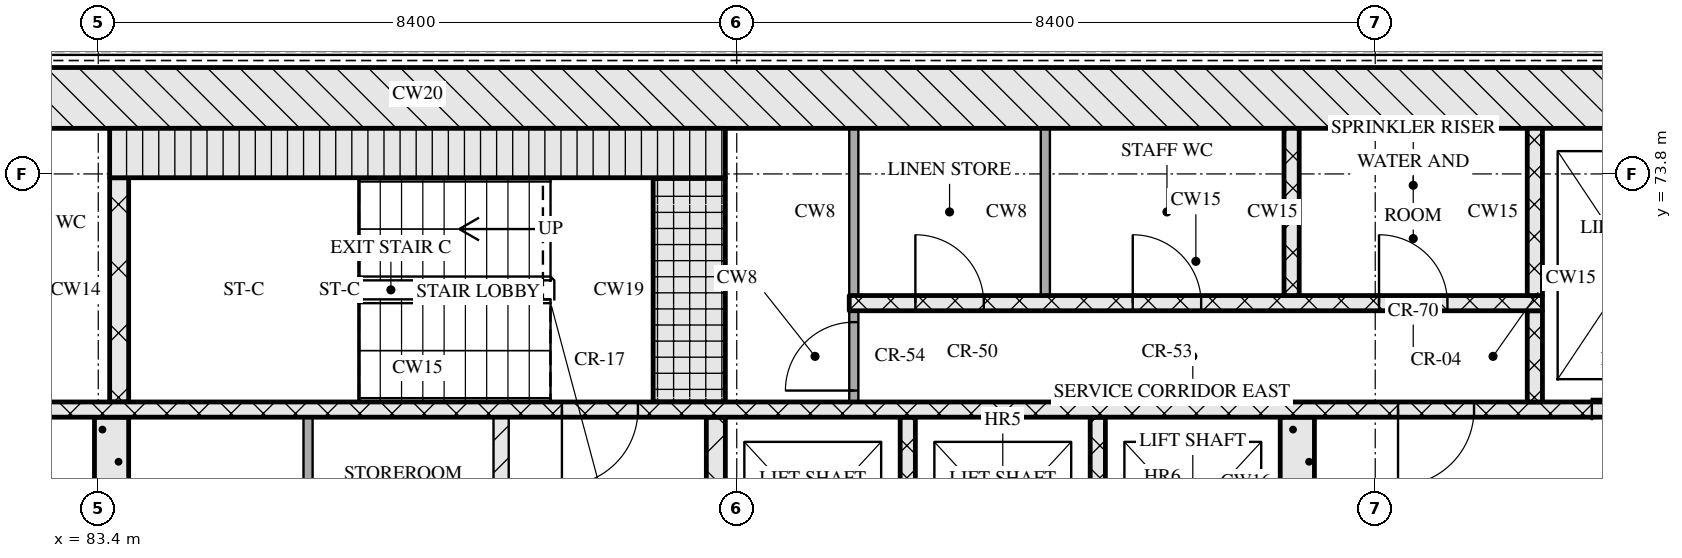
"""IFC4 building model, lengths in metres.
Left out: names, types, materials, properties, quantities, classifications, styles, units other than length and angle.
Written with IfcOpenShell. Run it as: python <this file> out.ifc"""

import sys

from ifc_helpers import new_model, si_unit, direction, frame, frame_2d, origin, place, context, subcontext, project, spatial, rectangle, extrude, element, fill, save


model = new_model("IFC4")
c1 = context("Model", 3, precision=1e-05, world=origin(), true_north=direction((0.0, 1.0)))
c2 = subcontext(c1, "Body", "Model", "MODEL_VIEW")
j1 = project(units=[si_unit("LENGTHUNIT", "METRE"), si_unit("PLANEANGLEUNIT", "RADIAN")], contexts=[c1])
p1 = place(None, origin())
s1 = spatial("IfcSite", under=j1, at=p1, CompositionType="ELEMENT")
p2 = place(p1, origin())
s2 = spatial("IfcBuilding", under=s1, at=p2, CompositionType="ELEMENT")
p3 = place(p2, frame((0.0, 0.0, 151.05)))
s3 = spatial("IfcBuildingStorey", under=s2, at=p3, CompositionType="ELEMENT", Elevation=151.05)
p4 = place(p3, frame((67.0, 74.8, 0.0), z_axis=(0.0, 0.0, 1.0), x_axis=(1.0, 0.0, 0.0)))
e1 = element("IfcWall", 1, at=p4, inside=s3, PredefinedType="SOLIDWALL", context=c2, shape_type="SweptSolid", body=[
    extrude(rectangle(XDim=41.2, YDim=0.8, at=frame_2d((20.6, 0.0))), origin(), (0.0, 0.0, 1.0), 3.32),
])
p5 = place(p3, frame((83.575, 68.0, 0.0), z_axis=(0.0, 0.0, 1.0), x_axis=(0.0, 1.0, 0.0)))
e2 = element("IfcWall", 2, at=p5, inside=s3, PredefinedType="SOLIDWALL", context=c2, shape_type="SweptSolid", body=[
    extrude(rectangle(XDim=2.6, YDim=0.45, at=frame_2d((1.3, 0.0))), origin(), (0.0, 0.0, 1.0), 3.32),
])
p6 = place(p3, frame((86.16, 68.0, 0.0), z_axis=(0.0, 0.0, 1.0), x_axis=(0.0, 1.0, 0.0)))
e3 = element("IfcWall", 3, at=p6, inside=s3, PredefinedType="PARTITIONING", context=c2, shape_type="SweptSolid", body=[
    extrude(rectangle(XDim=2.6, YDim=0.12, at=frame_2d((1.3, 0.0))), origin(), (0.0, 0.0, 1.0), 3.32),
])
p7 = place(p3, frame((88.7, 68.0, 0.0), z_axis=(0.0, 0.0, 1.0), x_axis=(0.0, 1.0, 0.0)))
e4 = element("IfcWall", 4, at=p7, inside=s3, PredefinedType="PARTITIONING", context=c2, shape_type="SweptSolid", body=[
    extrude(rectangle(XDim=2.6, YDim=0.2, at=frame_2d((1.3, 0.0))), origin(), (0.0, 0.0, 1.0), 3.32),
])
p8 = place(p3, frame((91.525, 68.0, 0.0), z_axis=(0.0, 0.0, 1.0), x_axis=(0.0, 1.0, 0.0)))
e5 = element("IfcWall", 5, at=p8, inside=s3, PredefinedType="SOLIDWALL", context=c2, shape_type="SweptSolid", body=[
    extrude(rectangle(XDim=2.6, YDim=0.25, at=frame_2d((1.3, 0.0))), origin(), (0.0, 0.0, 1.0), 3.32),
])
for number, where, z_axis, x_axis in (
    (6, (94.05, 68.0, 0.0), (0.0, 0.0, 1.0), (0.0, 1.0, 0.0)),
    (7, (96.55, 68.0, 0.0), (0.0, 0.0, 1.0), (0.0, 1.0, 0.0)),
):
    element("IfcWall", number, at=place(p3, frame(where, z_axis=z_axis, x_axis=x_axis)), inside=s3, PredefinedType="SOLIDWALL", context=c2, shape_type="SweptSolid", body=[
        extrude(rectangle(XDim=2.6, YDim=0.2, at=frame_2d((1.3, 0.0))), origin(), (0.0, 0.0, 1.0), 3.32),
    ])
p9 = place(p3, frame((99.175, 68.3, 0.0), z_axis=(0.0, 0.0, 1.0), x_axis=(0.0, 1.0, 0.0)))
e8 = element("IfcWall", 8, at=p9, inside=s3, PredefinedType="SOLIDWALL", context=c2, shape_type="SweptSolid", body=[
    extrude(rectangle(XDim=2.3, YDim=0.45, at=frame_2d((1.15, 0.0))), origin(), (0.0, 0.0, 1.0), 3.32),
])
p10 = place(p3, frame((67.8, 70.7, 0.0), z_axis=(0.0, 0.0, 1.0), x_axis=(1.0, 0.0, 0.0)))
e9 = element("IfcWall", 9, at=p10, inside=s3, PredefinedType="SOLIDWALL", context=c2, shape_type="SweptSolid", body=[
    extrude(rectangle(XDim=39.6, YDim=0.2, at=frame_2d((19.8, 0.0))), origin(), (0.0, 0.0, 1.0), 3.32),
])
p11 = place(p10, frame((0.65, 0.0, 0.0)))
e10 = element("IfcOpeningElement", 10, at=p11, cuts=e9, PredefinedType="OPENING", context=c2, shape_type="SweptSolid", body=[
    extrude(rectangle(XDim=1.1, YDim=2.1, at=frame_2d((0.55, 1.05))), frame((0.0, 0.11, 0.0), z_axis=(0.0, -1.0, 0.0), x_axis=(1.0, 0.0, 0.0)), (0.0, 0.0, 1.0), 0.22),
])
p12 = place(p10, frame((3.25, 0.0, 0.0)))
e11 = element("IfcOpeningElement", 11, at=p12, cuts=e9, PredefinedType="OPENING", context=c2, shape_type="SweptSolid", body=[
    extrude(rectangle(XDim=1.1, YDim=2.1, at=frame_2d((0.55, 1.05))), frame((0.0, 0.11, 0.0), z_axis=(0.0, -1.0, 0.0), x_axis=(1.0, 0.0, 0.0)), (0.0, 0.0, 1.0), 0.22),
])
p13 = place(p10, frame((5.9, 0.0, 0.0)))
e12 = element("IfcOpeningElement", 12, at=p13, cuts=e9, PredefinedType="OPENING", context=c2, shape_type="SweptSolid", body=[
    extrude(rectangle(XDim=1.0, YDim=2.1, at=frame_2d((0.5, 1.05))), frame((0.0, 0.11, 0.0), z_axis=(0.0, -1.0, 0.0), x_axis=(1.0, 0.0, 0.0)), (0.0, 0.0, 1.0), 0.22),
])
p14 = place(p10, frame((21.7, 0.0, 0.0)))
e13 = element("IfcOpeningElement", 13, at=p14, cuts=e9, PredefinedType="OPENING", context=c2, shape_type="SweptSolid", body=[
    extrude(rectangle(XDim=1.0, YDim=2.1, at=frame_2d((0.5, 1.05))), frame((0.0, 0.11, 0.0), z_axis=(0.0, -1.0, 0.0), x_axis=(1.0, 0.0, 0.0)), (0.0, 0.0, 1.0), 0.22),
])
p15 = place(p10, frame((32.7, 0.0, 0.0)))
e14 = element("IfcOpeningElement", 14, at=p15, cuts=e9, PredefinedType="OPENING", context=c2, shape_type="SweptSolid", body=[
    extrude(rectangle(XDim=1.0, YDim=2.1, at=frame_2d((0.5, 1.05))), frame((0.0, 0.11, 0.0), z_axis=(0.0, -1.0, 0.0), x_axis=(1.0, 0.0, 0.0)), (0.0, 0.0, 1.0), 0.22),
])
p16 = place(p10, frame((35.25, 0.0, 0.0)))
e15 = element("IfcOpeningElement", 15, at=p16, cuts=e9, PredefinedType="OPENING", context=c2, shape_type="SweptSolid", body=[
    extrude(rectangle(XDim=1.1, YDim=2.1, at=frame_2d((0.55, 1.05))), frame((0.0, 0.11, 0.0), z_axis=(0.0, -1.0, 0.0), x_axis=(1.0, 0.0, 0.0)), (0.0, 0.0, 1.0), 0.22),
])
p17 = place(p10, frame((37.85, 0.0, 0.0)))
e16 = element("IfcOpeningElement", 16, at=p17, cuts=e9, PredefinedType="OPENING", context=c2, shape_type="SweptSolid", body=[
    extrude(rectangle(XDim=1.1, YDim=2.1, at=frame_2d((0.55, 1.05))), frame((0.0, 0.11, 0.0), z_axis=(0.0, -1.0, 0.0), x_axis=(1.0, 0.0, 0.0)), (0.0, 0.0, 1.0), 0.22),
])
p18 = place(p3, frame((83.675, 70.8, 0.0), z_axis=(0.0, 0.0, 1.0), x_axis=(0.0, 1.0, 0.0)))
e17 = element("IfcWall", 17, at=p18, inside=s3, PredefinedType="SOLIDWALL", context=c2, shape_type="SweptSolid", body=[
    extrude(rectangle(XDim=2.95, YDim=0.25, at=frame_2d((1.475, 0.0))), origin(), (0.0, 0.0, 1.0), 3.32),
])
p19 = place(p3, frame((91.175, 70.8, 0.0), z_axis=(0.0, 0.0, 1.0), x_axis=(0.0, 1.0, 0.0)))
e18 = element("IfcWall", 18, at=p19, inside=s3, PredefinedType="SOLIDWALL", context=c2, shape_type="SweptSolid", body=[
    extrude(rectangle(XDim=2.95, YDim=0.95, at=frame_2d((1.475, 0.0))), origin(), (0.0, 0.0, 1.0), 3.32),
])
p20 = place(p3, frame((93.34, 70.8, 0.0), z_axis=(0.0, 0.0, 1.0), x_axis=(0.0, 1.0, 0.0)))
e19 = element("IfcWall", 19, at=p20, inside=s3, PredefinedType="PARTITIONING", context=c2, shape_type="SweptSolid", body=[
    extrude(rectangle(XDim=1.2, YDim=0.12, at=frame_2d((0.6, 0.0))), origin(), (0.0, 0.0, 1.0), 3.32),
])
p21 = place(p20, frame((0.15, 0.0, 0.0)))
e20 = element("IfcOpeningElement", 20, at=p21, cuts=e19, PredefinedType="OPENING", context=c2, shape_type="SweptSolid", body=[
    extrude(rectangle(XDim=0.9, YDim=2.1, at=frame_2d((0.45, 1.05))), frame((0.0, 0.07, 0.0), z_axis=(0.0, -1.0, 0.0), x_axis=(1.0, 0.0, 0.0)), (0.0, 0.0, 1.0), 0.14),
])
p22 = place(p3, frame((102.3, 70.8, 0.0), z_axis=(0.0, 0.0, 1.0), x_axis=(0.0, 1.0, 0.0)))
e21 = element("IfcWall", 21, at=p22, inside=s3, PredefinedType="SOLIDWALL", context=c2, shape_type="SweptSolid", body=[
    extrude(rectangle(XDim=1.2, YDim=0.2, at=frame_2d((0.6, 0.0))), origin(), (0.0, 0.0, 1.0), 3.32),
])
p23 = place(p3, frame((93.28, 72.1, 0.0), z_axis=(0.0, 0.0, 1.0), x_axis=(1.0, 0.0, 0.0)))
e22 = element("IfcWall", 22, at=p23, inside=s3, PredefinedType="SOLIDWALL", context=c2, shape_type="SweptSolid", body=[
    extrude(rectangle(XDim=9.12, YDim=0.2, at=frame_2d((4.56, 0.0))), origin(), (0.0, 0.0, 1.0), 3.32),
])
p24 = place(p23, frame((0.87, 0.0, 0.0)))
e23 = element("IfcOpeningElement", 23, at=p24, cuts=e22, PredefinedType="OPENING", context=c2, shape_type="SweptSolid", body=[
    extrude(rectangle(XDim=0.9, YDim=2.1, at=frame_2d((0.45, 1.05))), frame((0.0, 0.11, 0.0), z_axis=(0.0, -1.0, 0.0), x_axis=(1.0, 0.0, 0.0)), (0.0, 0.0, 1.0), 0.22),
])
p25 = place(p23, frame((3.73, 0.0, 0.0)))
e24 = element("IfcOpeningElement", 24, at=p25, cuts=e22, PredefinedType="OPENING", context=c2, shape_type="SweptSolid", body=[
    extrude(rectangle(XDim=0.9, YDim=2.1, at=frame_2d((0.45, 1.05))), frame((0.0, 0.11, 0.0), z_axis=(0.0, -1.0, 0.0), x_axis=(1.0, 0.0, 0.0)), (0.0, 0.0, 1.0), 0.22),
])
p26 = place(p23, frame((6.97, 0.0, 0.0)))
e25 = element("IfcOpeningElement", 25, at=p26, cuts=e22, PredefinedType="OPENING", context=c2, shape_type="SweptSolid", body=[
    extrude(rectangle(XDim=0.9, YDim=2.1, at=frame_2d((0.45, 1.05))), frame((0.0, 0.11, 0.0), z_axis=(0.0, -1.0, 0.0), x_axis=(1.0, 0.0, 0.0)), (0.0, 0.0, 1.0), 0.22),
])
for number, where, z_axis, x_axis in (
    (26, (93.34, 72.2, 0.0), (0.0, 0.0, 1.0), (0.0, 1.0, 0.0)),
    (27, (95.86, 72.2, 0.0), (0.0, 0.0, 1.0), (0.0, 1.0, 0.0)),
):
    element("IfcWall", number, at=place(p3, frame(where, z_axis=z_axis, x_axis=x_axis)), inside=s3, PredefinedType="PARTITIONING", context=c2, shape_type="SweptSolid", body=[
        extrude(rectangle(XDim=2.2, YDim=0.12, at=frame_2d((1.1, 0.0))), origin(), (0.0, 0.0, 1.0), 3.32),
    ])
for number, where, z_axis, x_axis in (
    (28, (99.1, 72.2, 0.0), (0.0, 0.0, 1.0), (0.0, 1.0, 0.0)),
    (29, (102.3, 72.2, 0.0), (0.0, 0.0, 1.0), (0.0, 1.0, 0.0)),
):
    element("IfcWall", number, at=place(p3, frame(where, z_axis=z_axis, x_axis=x_axis)), inside=s3, PredefinedType="SOLIDWALL", context=c2, shape_type="SweptSolid", body=[
        extrude(rectangle(XDim=2.2, YDim=0.2, at=frame_2d((1.1, 0.0))), origin(), (0.0, 0.0, 1.0), 3.32),
    ])
p27 = place(p3, frame((83.55, 74.075, 0.0), z_axis=(0.0, 0.0, 1.0), x_axis=(1.0, 0.0, 0.0)))
e30 = element("IfcWall", 30, at=p27, inside=s3, PredefinedType="SOLIDWALL", context=c2, shape_type="SweptSolid", body=[
    extrude(rectangle(XDim=8.1, YDim=0.65, at=frame_2d((4.05, 0.0))), origin(), (0.0, 0.0, 1.0), 3.32),
])
p28 = place(p14, origin())
e31 = element("IfcDoor", 31, at=p28, inside=s3, OperationType="SINGLE_SWING_RIGHT", PredefinedType="DOOR", context=c2, shape_type="SweptSolid", body=[
    extrude(rectangle(XDim=1.0, YDim=2.1, at=frame_2d((0.5, 1.05))), frame((0.0, 0.025, 0.0), z_axis=(0.0, -1.0, 0.0), x_axis=(1.0, 0.0, 0.0)), (0.0, 0.0, 1.0), 0.05),
])
fill(e13, e31)
p29 = place(p15, origin())
e32 = element("IfcDoor", 32, at=p29, inside=s3, OperationType="SINGLE_SWING_RIGHT", PredefinedType="DOOR", context=c2, shape_type="SweptSolid", body=[
    extrude(rectangle(XDim=1.0, YDim=2.1, at=frame_2d((0.5, 1.05))), frame((0.0, 0.025, 0.0), z_axis=(0.0, -1.0, 0.0), x_axis=(1.0, 0.0, 0.0)), (0.0, 0.0, 1.0), 0.05),
])
fill(e14, e32)
p30 = place(p16, origin())
e33 = element("IfcDoor", 33, at=p30, inside=s3, OperationType="SLIDING_TO_RIGHT", PredefinedType="DOOR", context=c2, shape_type="SweptSolid", body=[
    extrude(rectangle(XDim=1.1, YDim=2.1, at=frame_2d((0.55, 1.05))), frame((0.0, 0.025, 0.0), z_axis=(0.0, -1.0, 0.0), x_axis=(1.0, 0.0, 0.0)), (0.0, 0.0, 1.0), 0.05),
])
fill(e15, e33)
p31 = place(p21, origin())
e34 = element("IfcDoor", 34, at=p31, inside=s3, OperationType="SINGLE_SWING_LEFT", PredefinedType="DOOR", context=c2, shape_type="SweptSolid", body=[
    extrude(rectangle(XDim=0.9, YDim=2.1, at=frame_2d((0.45, 1.05))), frame((0.0, 0.025, 0.0), z_axis=(0.0, -1.0, 0.0), x_axis=(1.0, 0.0, 0.0)), (0.0, 0.0, 1.0), 0.05),
])
fill(e20, e34)
p32 = place(p24, origin())
e35 = element("IfcDoor", 35, at=p32, inside=s3, OperationType="SINGLE_SWING_LEFT", PredefinedType="DOOR", context=c2, shape_type="SweptSolid", body=[
    extrude(rectangle(XDim=0.9, YDim=2.1, at=frame_2d((0.45, 1.05))), frame((0.0, 0.025, 0.0), z_axis=(0.0, -1.0, 0.0), x_axis=(1.0, 0.0, 0.0)), (0.0, 0.0, 1.0), 0.05),
])
fill(e23, e35)
p33 = place(p25, origin())
e36 = element("IfcDoor", 36, at=p33, inside=s3, OperationType="SINGLE_SWING_LEFT", PredefinedType="DOOR", context=c2, shape_type="SweptSolid", body=[
    extrude(rectangle(XDim=0.9, YDim=2.1, at=frame_2d((0.45, 1.05))), frame((0.0, 0.025, 0.0), z_axis=(0.0, -1.0, 0.0), x_axis=(1.0, 0.0, 0.0)), (0.0, 0.0, 1.0), 0.05),
])
fill(e24, e36)
p34 = place(p26, origin())
e37 = element("IfcDoor", 37, at=p34, inside=s3, OperationType="SINGLE_SWING_LEFT", PredefinedType="DOOR", context=c2, shape_type="SweptSolid", body=[
    extrude(rectangle(XDim=0.9, YDim=2.1, at=frame_2d((0.45, 1.05))), frame((0.0, 0.025, 0.0), z_axis=(0.0, -1.0, 0.0), x_axis=(1.0, 0.0, 0.0)), (0.0, 0.0, 1.0), 0.05),
])
fill(e25, e37)
save(model, sys.argv[1])
